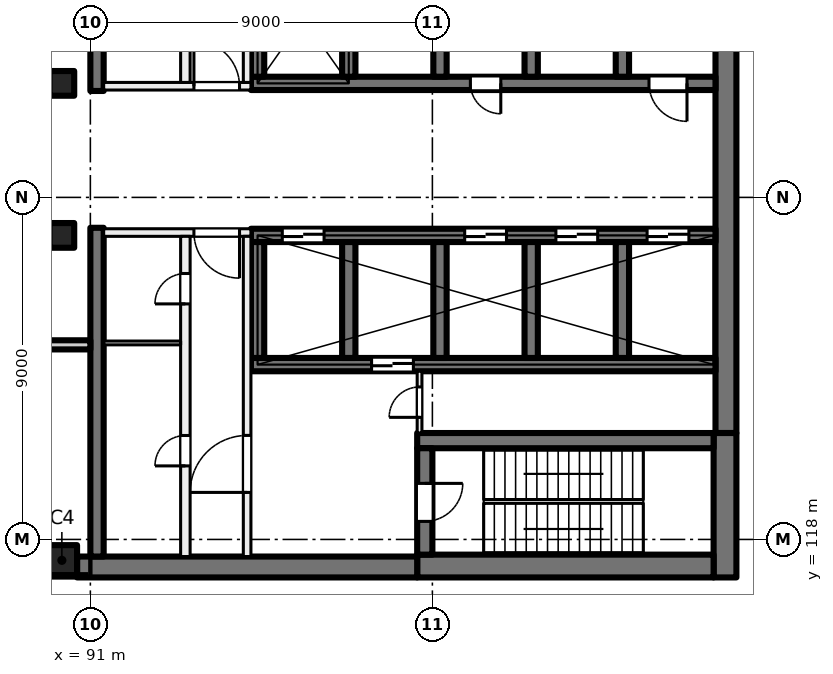
"""IFC4 building model, lengths in metres.
Left out: names, types, materials, properties, quantities, classifications, styles, units other than length and angle.
Written with IfcOpenShell. Run it as: python <this file> out.ifc"""

import sys

from ifc_helpers import new_model, si_unit, direction, frame, frame_2d, origin, origin_2d, place, context, subcontext, project, spatial, rectangle, extrude, element, fill, save


model = new_model("IFC4")
c1 = context("Model", 3, precision=1e-05, world=origin(), true_north=direction((0.0, 1.0)))
c2 = subcontext(c1, "Body", "Model", "MODEL_VIEW")
j1 = project(units=[si_unit("LENGTHUNIT", "METRE"), si_unit("PLANEANGLEUNIT", "RADIAN")], contexts=[c1])
p1 = place(None, origin())
s1 = spatial("IfcSite", under=j1, at=p1, CompositionType="ELEMENT")
p2 = place(p1, origin())
s2 = spatial("IfcBuilding", under=s1, at=p2, CompositionType="ELEMENT")
p3 = place(p2, frame((0.0, 0.0, 182.5)))
s3 = spatial("IfcBuildingStorey", under=s2, at=p3, CompositionType="ELEMENT", Elevation=182.5)
for number, where, z_axis, x_axis in (
    (1, (90.25, 130.0, 0.0), (0.0, 0.0, 1.0), (1.0, 0.0, 0.0)),
    (2, (90.25, 126.0, 0.0), (0.0, 0.0, 1.0), (1.0, 0.0, 0.0)),
):
    element("IfcColumn", number, at=place(p3, frame(where, z_axis=z_axis, x_axis=x_axis)), inside=s3, PredefinedType="COLUMN", context=c2, shape_type="SweptSolid", body=[
        extrude(rectangle(XDim=0.65, YDim=0.65, at=origin_2d()), origin(), (0.0, 0.0, 1.0), 5.5),
    ])
p4 = place(p3, frame((90.25, 117.45, 0.0), z_axis=(0.0, 0.0, 1.0), x_axis=(1.0, 0.0, 0.0)))
e3 = element("IfcColumn", 3, at=p4, inside=s3, PredefinedType="COLUMN", context=c2, shape_type="SweptSolid", body=[
    extrude(rectangle(XDim=0.8, YDim=0.8, at=origin_2d()), origin(), (0.0, 0.0, 1.0), 5.5),
])
p5 = place(p3, frame((107.725, 135.2, 0.0), z_axis=(0.0, 0.0, 1.0), x_axis=(0.0, -1.0, 0.0)))
e4 = element("IfcWall", 4, at=p5, inside=s3, PredefinedType="SHEAR", context=c2, shape_type="SweptSolid", body=[
    extrude(rectangle(XDim=14.4, YDim=0.55, at=frame_2d((7.2, 0.0))), origin(), (0.0, 0.0, 1.0), 5.5),
])
p6 = place(p3, frame((107.7, 120.8, 0.0), z_axis=(0.0, 0.0, 1.0), x_axis=(0.0, -1.0, 0.0)))
e5 = element("IfcWall", 5, at=p6, inside=s3, PredefinedType="SHEAR", context=c2, shape_type="SweptSolid", body=[
    extrude(rectangle(XDim=3.8, YDim=0.6, at=frame_2d((1.9, 0.0))), origin(), (0.0, 0.0, 1.0), 5.5),
])
p7 = place(p3, frame((107.4, 117.3, 0.0), z_axis=(0.0, 0.0, 1.0), x_axis=(-1.0, 0.0, 0.0)))
e6 = element("IfcWall", 6, at=p7, inside=s3, PredefinedType="SHEAR", context=c2, shape_type="SweptSolid", body=[
    extrude(rectangle(XDim=7.8, YDim=0.6, at=frame_2d((3.9, 0.0))), origin(), (0.0, 0.0, 1.0), 5.5),
])
p8 = place(p3, frame((99.6, 117.275, 0.0), z_axis=(0.0, 0.0, 1.0), x_axis=(-1.0, 0.0, 0.0)))
e7 = element("IfcWall", 7, at=p8, inside=s3, PredefinedType="SHEAR", context=c2, shape_type="SweptSolid", body=[
    extrude(rectangle(XDim=8.95, YDim=0.55, at=frame_2d((4.475, 0.0))), origin(), (0.0, 0.0, 1.0), 5.5),
])
p9 = place(p3, frame((107.4, 120.6, 0.0), z_axis=(0.0, 0.0, 1.0), x_axis=(-1.0, 0.0, 0.0)))
e8 = element("IfcWall", 8, at=p9, inside=s3, PredefinedType="SHEAR", context=c2, shape_type="SweptSolid", body=[
    extrude(rectangle(XDim=7.8, YDim=0.4, at=frame_2d((3.9, 0.0))), origin(), (0.0, 0.0, 1.0), 5.5),
])
p10 = place(p3, frame((99.8, 120.4, 0.0), z_axis=(0.0, 0.0, 1.0), x_axis=(0.0, -1.0, 0.0)))
e9 = element("IfcWall", 9, at=p10, inside=s3, PredefinedType="SHEAR", context=c2, shape_type="SweptSolid", body=[
    extrude(rectangle(XDim=2.8, YDim=0.4, at=frame_2d((1.4, 0.0))), origin(), (0.0, 0.0, 1.0), 5.5),
])
p11 = place(p10, frame((0.925, 0.0, 0.0)))
e10 = element("IfcOpeningElement", 10, at=p11, cuts=e9, PredefinedType="OPENING", context=c2, shape_type="SweptSolid", body=[
    extrude(rectangle(XDim=1.0, YDim=2.1, at=frame_2d((0.5, 1.05))), frame((0.0, 0.21, 0.0), z_axis=(0.0, -1.0, 0.0), x_axis=(1.0, 0.0, 0.0)), (0.0, 0.0, 1.0), 0.42),
])
p12 = place(p3, frame((107.45, 130.0, 0.0), z_axis=(0.0, 0.0, 1.0), x_axis=(-1.0, 0.0, 0.0)))
e11 = element("IfcWall", 11, at=p12, inside=s3, PredefinedType="SHEAR", context=c2, shape_type="SweptSolid", body=[
    extrude(rectangle(XDim=12.225, YDim=0.35, at=frame_2d((6.112, 0.0))), origin(), (0.0, 0.0, 1.0), 5.5),
])
p13 = place(p12, frame((0.75, 0.0, 0.0)))
e12 = element("IfcOpeningElement", 12, at=p13, cuts=e11, PredefinedType="OPENING", context=c2, shape_type="SweptSolid", body=[
    extrude(rectangle(XDim=1.0, YDim=2.1, at=frame_2d((0.5, 1.05))), frame((0.0, 0.185, 0.0), z_axis=(0.0, -1.0, 0.0), x_axis=(1.0, 0.0, 0.0)), (0.0, 0.0, 1.0), 0.37),
])
p14 = place(p12, frame((5.65, 0.0, 0.0)))
e13 = element("IfcOpeningElement", 13, at=p14, cuts=e11, PredefinedType="OPENING", context=c2, shape_type="SweptSolid", body=[
    extrude(rectangle(XDim=0.8, YDim=2.1, at=frame_2d((0.4, 1.05))), frame((0.0, 0.185, 0.0), z_axis=(0.0, -1.0, 0.0), x_axis=(1.0, 0.0, 0.0)), (0.0, 0.0, 1.0), 0.37),
])
for number, where, z_axis, x_axis in (
    (14, (105.0, 133.225, 0.0), (0.0, 0.0, 1.0), (0.0, -1.0, 0.0)),
    (15, (102.6, 133.225, 0.0), (0.0, 0.0, 1.0), (0.0, -1.0, 0.0)),
    (16, (100.2, 133.225, 0.0), (0.0, 0.0, 1.0), (0.0, -1.0, 0.0)),
    (17, (97.8, 133.225, 0.0), (0.0, 0.0, 1.0), (0.0, -1.0, 0.0)),
    (18, (95.4, 133.225, 0.0), (0.0, 0.0, 1.0), (0.0, -1.0, 0.0)),
):
    element("IfcWall", number, at=place(p3, frame(where, z_axis=z_axis, x_axis=x_axis)), inside=s3, PredefinedType="SHEAR", context=c2, shape_type="SweptSolid", body=[
        extrude(rectangle(XDim=3.05, YDim=0.35, at=frame_2d((1.525, 0.0))), origin(), (0.0, 0.0, 1.0), 5.5),
    ])
p15 = place(p3, frame((107.45, 126.0, 0.0), z_axis=(0.0, 0.0, 1.0), x_axis=(-1.0, 0.0, 0.0)))
e19 = element("IfcWall", 19, at=p15, inside=s3, PredefinedType="SHEAR", context=c2, shape_type="SweptSolid", body=[
    extrude(rectangle(XDim=12.225, YDim=0.35, at=frame_2d((6.112, 0.0))), origin(), (0.0, 0.0, 1.0), 5.5),
])
p16 = place(p15, frame((0.7, 0.0, 0.0)))
e20 = element("IfcOpeningElement", 20, at=p16, cuts=e19, PredefinedType="OPENING", context=c2, shape_type="SweptSolid", body=[
    extrude(rectangle(XDim=1.1, YDim=2.1, at=frame_2d((0.55, 1.05))), frame((0.0, 0.185, 0.0), z_axis=(0.0, -1.0, 0.0), x_axis=(1.0, 0.0, 0.0)), (0.0, 0.0, 1.0), 0.37),
])
p17 = place(p15, frame((3.1, 0.0, 0.0)))
e21 = element("IfcOpeningElement", 21, at=p17, cuts=e19, PredefinedType="OPENING", context=c2, shape_type="SweptSolid", body=[
    extrude(rectangle(XDim=1.1, YDim=2.1, at=frame_2d((0.55, 1.05))), frame((0.0, 0.185, 0.0), z_axis=(0.0, -1.0, 0.0), x_axis=(1.0, 0.0, 0.0)), (0.0, 0.0, 1.0), 0.37),
])
p18 = place(p15, frame((5.5, 0.0, 0.0)))
e22 = element("IfcOpeningElement", 22, at=p18, cuts=e19, PredefinedType="OPENING", context=c2, shape_type="SweptSolid", body=[
    extrude(rectangle(XDim=1.1, YDim=2.1, at=frame_2d((0.55, 1.05))), frame((0.0, 0.185, 0.0), z_axis=(0.0, -1.0, 0.0), x_axis=(1.0, 0.0, 0.0)), (0.0, 0.0, 1.0), 0.37),
])
p19 = place(p15, frame((10.3, 0.0, 0.0)))
e23 = element("IfcOpeningElement", 23, at=p19, cuts=e19, PredefinedType="OPENING", context=c2, shape_type="SweptSolid", body=[
    extrude(rectangle(XDim=1.1, YDim=2.1, at=frame_2d((0.55, 1.05))), frame((0.0, 0.185, 0.0), z_axis=(0.0, -1.0, 0.0), x_axis=(1.0, 0.0, 0.0)), (0.0, 0.0, 1.0), 0.37),
])
p20 = place(p3, frame((107.45, 122.6, 0.0), z_axis=(0.0, 0.0, 1.0), x_axis=(-1.0, 0.0, 0.0)))
e24 = element("IfcWall", 24, at=p20, inside=s3, PredefinedType="SHEAR", context=c2, shape_type="SweptSolid", body=[
    extrude(rectangle(XDim=12.225, YDim=0.35, at=frame_2d((6.112, 0.0))), origin(), (0.0, 0.0, 1.0), 5.5),
])
p21 = place(p20, frame((7.95, 0.0, 0.0)))
e25 = element("IfcOpeningElement", 25, at=p21, cuts=e24, PredefinedType="OPENING", context=c2, shape_type="SweptSolid", body=[
    extrude(rectangle(XDim=1.1, YDim=2.1, at=frame_2d((0.55, 1.05))), frame((0.0, 0.185, 0.0), z_axis=(0.0, -1.0, 0.0), x_axis=(1.0, 0.0, 0.0)), (0.0, 0.0, 1.0), 0.37),
])
for number, where, z_axis, x_axis in (
    (26, (105.0, 125.825, 0.0), (0.0, 0.0, 1.0), (0.0, -1.0, 0.0)),
    (27, (102.6, 125.825, 0.0), (0.0, 0.0, 1.0), (0.0, -1.0, 0.0)),
    (28, (100.2, 125.825, 0.0), (0.0, 0.0, 1.0), (0.0, -1.0, 0.0)),
    (29, (97.8, 125.825, 0.0), (0.0, 0.0, 1.0), (0.0, -1.0, 0.0)),
    (30, (95.4, 125.825, 0.0), (0.0, 0.0, 1.0), (0.0, -1.0, 0.0)),
):
    element("IfcWall", number, at=place(p3, frame(where, z_axis=z_axis, x_axis=x_axis)), inside=s3, PredefinedType="SHEAR", context=c2, shape_type="SweptSolid", body=[
        extrude(rectangle(XDim=3.05, YDim=0.35, at=frame_2d((1.525, 0.0))), origin(), (0.0, 0.0, 1.0), 5.5),
    ])
for number, where, z_axis, x_axis in (
    (31, (91.175, 138.45, 0.0), (0.0, 0.0, 1.0), (0.0, -1.0, 0.0)),
    (32, (91.175, 126.2, 0.0), (0.0, 0.0, 1.0), (0.0, -1.0, 0.0)),
):
    element("IfcWall", number, at=place(p3, frame(where, z_axis=z_axis, x_axis=x_axis)), inside=s3, PredefinedType="SHEAR", context=c2, shape_type="SweptSolid", body=[
        extrude(rectangle(XDim=8.65, YDim=0.35, at=frame_2d((4.325, 0.0))), origin(), (0.0, 0.0, 1.0), 5.5),
    ])
p22 = place(p3, frame((91.0, 123.12, 0.0), z_axis=(0.0, 0.0, 1.0), x_axis=(-1.0, 0.0, 0.0)))
e33 = element("IfcWall", 33, at=p22, inside=s3, PredefinedType="SOLIDWALL", context=c2, shape_type="SweptSolid", body=[
    extrude(rectangle(XDim=4.221, YDim=0.24, at=frame_2d((2.11, 0.0))), origin(), (0.0, 0.0, 1.0), 5.125),
])
p23 = place(p22, frame((1.21, 0.0, 0.0)))
e34 = element("IfcOpeningElement", 34, at=p23, cuts=e33, PredefinedType="OPENING", context=c2, shape_type="SweptSolid", body=[
    extrude(rectangle(XDim=1.8, YDim=2.4, at=frame_2d((0.9, 1.2))), frame((0.0, 0.13, 0.0), z_axis=(0.0, -1.0, 0.0), x_axis=(1.0, 0.0, 0.0)), (0.0, 0.0, 1.0), 0.26),
])
p24 = place(p3, frame((95.225, 126.075, 0.0), z_axis=(0.0, 0.0, 1.0), x_axis=(-1.0, 0.0, 0.0)))
e35 = element("IfcWall", 35, at=p24, inside=s3, PredefinedType="PARTITIONING", context=c2, shape_type="SweptSolid", body=[
    extrude(rectangle(XDim=3.875, YDim=0.2, at=frame_2d((1.938, 0.0))), origin(), (0.0, 0.0, 1.0), 5.125),
])
p25 = place(p24, frame((0.3, 0.0, 0.0)))
e36 = element("IfcOpeningElement", 36, at=p25, cuts=e35, PredefinedType="OPENING", context=c2, shape_type="SweptSolid", body=[
    extrude(rectangle(XDim=1.2, YDim=2.1, at=frame_2d((0.6, 1.05))), frame((0.0, 0.11, 0.0), z_axis=(0.0, -1.0, 0.0), x_axis=(1.0, 0.0, 0.0)), (0.0, 0.0, 1.0), 0.22),
])
p26 = place(p3, frame((95.125, 117.55, 0.0), z_axis=(0.0, 0.0, 1.0), x_axis=(0.0, 1.0, 0.0)))
e37 = element("IfcWall", 37, at=p26, inside=s3, PredefinedType="PARTITIONING", context=c2, shape_type="SweptSolid", body=[
    extrude(rectangle(XDim=8.425, YDim=0.2, at=frame_2d((4.212, 0.0))), origin(), (0.0, 0.0, 1.0), 5.125),
])
p27 = place(p26, frame((1.688, 0.0, 0.0)))
e38 = element("IfcOpeningElement", 38, at=p27, cuts=e37, PredefinedType="OPENING", context=c2, shape_type="SweptSolid", body=[
    extrude(rectangle(XDim=1.5, YDim=2.1, at=frame_2d((0.75, 1.05))), frame((0.0, 0.11, 0.0), z_axis=(0.0, -1.0, 0.0), x_axis=(1.0, 0.0, 0.0)), (0.0, 0.0, 1.0), 0.22),
])
p28 = place(p3, frame((93.5, 117.55, 0.0), z_axis=(0.0, 0.0, 1.0), x_axis=(0.0, 1.0, 0.0)))
e39 = element("IfcWall", 39, at=p28, inside=s3, PredefinedType="PARTITIONING", context=c2, shape_type="SweptSolid", body=[
    extrude(rectangle(XDim=8.425, YDim=0.25, at=frame_2d((4.212, 0.0))), origin(), (0.0, 0.0, 1.0), 5.125),
])
p29 = place(p28, frame((6.647, 0.0, 0.0)))
e40 = element("IfcOpeningElement", 40, at=p29, cuts=e39, PredefinedType="OPENING", context=c2, shape_type="SweptSolid", body=[
    extrude(rectangle(XDim=0.8, YDim=2.1, at=frame_2d((0.4, 1.05))), frame((0.0, 0.135, 0.0), z_axis=(0.0, -1.0, 0.0), x_axis=(1.0, 0.0, 0.0)), (0.0, 0.0, 1.0), 0.27),
])
p30 = place(p28, frame((2.385, 0.0, 0.0)))
e41 = element("IfcOpeningElement", 41, at=p30, cuts=e39, PredefinedType="OPENING", context=c2, shape_type="SweptSolid", body=[
    extrude(rectangle(XDim=0.8, YDim=2.1, at=frame_2d((0.4, 1.05))), frame((0.0, 0.135, 0.0), z_axis=(0.0, -1.0, 0.0), x_axis=(1.0, 0.0, 0.0)), (0.0, 0.0, 1.0), 0.27),
])
p31 = place(p3, frame((99.663, 120.8, 0.0), z_axis=(0.0, 0.0, 1.0), x_axis=(0.0, 1.0, 0.0)))
e42 = element("IfcWall", 42, at=p31, inside=s3, PredefinedType="PARTITIONING", context=c2, shape_type="SweptSolid", body=[
    extrude(rectangle(XDim=1.625, YDim=0.125, at=frame_2d((0.812, 0.0))), origin(), (0.0, 0.0, 1.0), 5.125),
])
p32 = place(p31, frame((0.413, 0.0, 0.0)))
e43 = element("IfcOpeningElement", 43, at=p32, cuts=e42, PredefinedType="OPENING", context=c2, shape_type="SweptSolid", body=[
    extrude(rectangle(XDim=0.8, YDim=2.1, at=frame_2d((0.4, 1.05))), frame((0.0, 0.073, 0.0), z_axis=(0.0, -1.0, 0.0), x_axis=(1.0, 0.0, 0.0)), (0.0, 0.0, 1.0), 0.145),
])
p33 = place(p3, frame((93.375, 123.17, 0.0), z_axis=(0.0, 0.0, 1.0), x_axis=(-1.0, 0.0, 0.0)))
e44 = element("IfcWall", 44, at=p33, inside=s3, PredefinedType="PARTITIONING", context=c2, shape_type="SweptSolid", body=[
    extrude(rectangle(XDim=2.025, YDim=0.1, at=frame_2d((1.012, 0.0))), origin(), (0.0, 0.0, 1.0), 5.125),
])
p34 = place(p3, frame((91.35, 129.925, 0.0), z_axis=(0.0, 0.0, 1.0), x_axis=(1.0, 0.0, 0.0)))
e45 = element("IfcWall", 45, at=p34, inside=s3, PredefinedType="PARTITIONING", context=c2, shape_type="SweptSolid", body=[
    extrude(rectangle(XDim=3.875, YDim=0.2, at=frame_2d((1.938, 0.0))), origin(), (0.0, 0.0, 1.0), 5.125),
])
p35 = place(p34, frame((2.375, 0.0, 0.0)))
e46 = element("IfcOpeningElement", 46, at=p35, cuts=e45, PredefinedType="OPENING", context=c2, shape_type="SweptSolid", body=[
    extrude(rectangle(XDim=1.2, YDim=2.1, at=frame_2d((0.6, 1.05))), frame((0.0, 0.11, 0.0), z_axis=(0.0, -1.0, 0.0), x_axis=(1.0, 0.0, 0.0)), (0.0, 0.0, 1.0), 0.22),
])
p36 = place(p3, frame((95.125, 130.025, 0.0), z_axis=(0.0, 0.0, 1.0), x_axis=(0.0, 1.0, 0.0)))
e47 = element("IfcWall", 47, at=p36, inside=s3, PredefinedType="PARTITIONING", context=c2, shape_type="SweptSolid", body=[
    extrude(rectangle(XDim=8.425, YDim=0.2, at=frame_2d((4.212, 0.0))), origin(), (0.0, 0.0, 1.0), 5.125),
])
p37 = place(p36, frame((5.238, 0.0, 0.0)))
e48 = element("IfcOpeningElement", 48, at=p37, cuts=e47, PredefinedType="OPENING", context=c2, shape_type="SweptSolid", body=[
    extrude(rectangle(XDim=1.5, YDim=2.1, at=frame_2d((0.75, 1.05))), frame((0.0, 0.11, 0.0), z_axis=(0.0, -1.0, 0.0), x_axis=(1.0, 0.0, 0.0)), (0.0, 0.0, 1.0), 0.22),
])
p38 = place(p3, frame((93.5, 130.025, 0.0), z_axis=(0.0, 0.0, 1.0), x_axis=(0.0, 1.0, 0.0)))
e49 = element("IfcWall", 49, at=p38, inside=s3, PredefinedType="PARTITIONING", context=c2, shape_type="SweptSolid", body=[
    extrude(rectangle(XDim=8.425, YDim=0.25, at=frame_2d((4.212, 0.0))), origin(), (0.0, 0.0, 1.0), 5.125),
])
p39 = place(p38, frame((3.712, 0.0, 0.0)))
e50 = element("IfcOpeningElement", 50, at=p39, cuts=e49, PredefinedType="OPENING", context=c2, shape_type="SweptSolid", body=[
    extrude(rectangle(XDim=1.0, YDim=2.1, at=frame_2d((0.5, 1.05))), frame((0.0, 0.135, 0.0), z_axis=(0.0, -1.0, 0.0), x_axis=(1.0, 0.0, 0.0)), (0.0, 0.0, 1.0), 0.27),
])
p40 = place(p16, origin())
e51 = element("IfcDoor", 51, at=p40, inside=s3, OperationType="DOUBLE_DOOR_SLIDING", PredefinedType="DOOR", context=c2, shape_type="SweptSolid", body=[
    extrude(rectangle(XDim=1.1, YDim=2.1, at=frame_2d((0.55, 1.05))), frame((0.0, 0.025, 0.0), z_axis=(0.0, -1.0, 0.0), x_axis=(1.0, 0.0, 0.0)), (0.0, 0.0, 1.0), 0.05),
])
fill(e20, e51)
p41 = place(p17, origin())
e52 = element("IfcDoor", 52, at=p41, inside=s3, OperationType="DOUBLE_DOOR_SLIDING", PredefinedType="DOOR", context=c2, shape_type="SweptSolid", body=[
    extrude(rectangle(XDim=1.1, YDim=2.1, at=frame_2d((0.55, 1.05))), frame((0.0, 0.025, 0.0), z_axis=(0.0, -1.0, 0.0), x_axis=(1.0, 0.0, 0.0)), (0.0, 0.0, 1.0), 0.05),
])
fill(e21, e52)
p42 = place(p18, origin())
e53 = element("IfcDoor", 53, at=p42, inside=s3, OperationType="DOUBLE_DOOR_SLIDING", PredefinedType="DOOR", context=c2, shape_type="SweptSolid", body=[
    extrude(rectangle(XDim=1.1, YDim=2.1, at=frame_2d((0.55, 1.05))), frame((0.0, 0.025, 0.0), z_axis=(0.0, -1.0, 0.0), x_axis=(1.0, 0.0, 0.0)), (0.0, 0.0, 1.0), 0.05),
])
fill(e22, e53)
p43 = place(p19, origin())
e54 = element("IfcDoor", 54, at=p43, inside=s3, OperationType="DOUBLE_DOOR_SLIDING", PredefinedType="DOOR", context=c2, shape_type="SweptSolid", body=[
    extrude(rectangle(XDim=1.1, YDim=2.1, at=frame_2d((0.55, 1.05))), frame((0.0, 0.025, 0.0), z_axis=(0.0, -1.0, 0.0), x_axis=(1.0, 0.0, 0.0)), (0.0, 0.0, 1.0), 0.05),
])
fill(e23, e54)
p44 = place(p13, origin())
e55 = element("IfcDoor", 55, at=p44, inside=s3, OperationType="SINGLE_SWING_LEFT", PredefinedType="DOOR", context=c2, shape_type="SweptSolid", body=[
    extrude(rectangle(XDim=1.0, YDim=2.1, at=frame_2d((0.5, 1.05))), frame((0.0, 0.025, 0.0), z_axis=(0.0, -1.0, 0.0), x_axis=(1.0, 0.0, 0.0)), (0.0, 0.0, 1.0), 0.05),
])
fill(e12, e55)
p45 = place(p14, origin())
e56 = element("IfcDoor", 56, at=p45, inside=s3, OperationType="SINGLE_SWING_RIGHT", PredefinedType="DOOR", context=c2, shape_type="SweptSolid", body=[
    extrude(rectangle(XDim=0.8, YDim=2.1, at=frame_2d((0.4, 1.05))), frame((0.0, 0.025, 0.0), z_axis=(0.0, -1.0, 0.0), x_axis=(1.0, 0.0, 0.0)), (0.0, 0.0, 1.0), 0.05),
])
fill(e13, e56)
p46 = place(p25, origin())
e57 = element("IfcDoor", 57, at=p46, inside=s3, OperationType="DOUBLE_DOOR_SINGLE_SWING", PredefinedType="DOOR", context=c2, shape_type="SweptSolid", body=[
    extrude(rectangle(XDim=1.2, YDim=2.1, at=frame_2d((0.6, 1.05))), frame((0.0, 0.025, 0.0), z_axis=(0.0, -1.0, 0.0), x_axis=(1.0, 0.0, 0.0)), (0.0, 0.0, 1.0), 0.05),
])
fill(e36, e57)
p47 = place(p27, origin())
e58 = element("IfcDoor", 58, at=p47, inside=s3, OperationType="DOUBLE_DOOR_SINGLE_SWING", PredefinedType="DOOR", context=c2, shape_type="SweptSolid", body=[
    extrude(rectangle(XDim=1.5, YDim=2.1, at=frame_2d((0.75, 1.05))), frame((0.0, 0.025, 0.0), z_axis=(0.0, -1.0, 0.0), x_axis=(1.0, 0.0, 0.0)), (0.0, 0.0, 1.0), 0.05),
])
fill(e38, e58)
p48 = place(p11, origin())
e59 = element("IfcDoor", 59, at=p48, inside=s3, OperationType="SINGLE_SWING_LEFT", PredefinedType="DOOR", context=c2, shape_type="SweptSolid", body=[
    extrude(rectangle(XDim=1.0, YDim=2.1, at=frame_2d((0.5, 1.05))), frame((0.0, 0.025, 0.0), z_axis=(0.0, -1.0, 0.0), x_axis=(1.0, 0.0, 0.0)), (0.0, 0.0, 1.0), 0.05),
])
fill(e10, e59)
p49 = place(p32, origin())
e60 = element("IfcDoor", 60, at=p49, inside=s3, OperationType="SINGLE_SWING_RIGHT", PredefinedType="DOOR", context=c2, shape_type="SweptSolid", body=[
    extrude(rectangle(XDim=0.8, YDim=2.1, at=frame_2d((0.4, 1.05))), frame((0.0, 0.025, 0.0), z_axis=(0.0, -1.0, 0.0), x_axis=(1.0, 0.0, 0.0)), (0.0, 0.0, 1.0), 0.05),
])
fill(e43, e60)
p50 = place(p29, origin())
e61 = element("IfcDoor", 61, at=p50, inside=s3, OperationType="SINGLE_SWING_LEFT", PredefinedType="DOOR", context=c2, shape_type="SweptSolid", body=[
    extrude(rectangle(XDim=0.8, YDim=2.1, at=frame_2d((0.4, 1.05))), frame((0.0, 0.025, 0.0), z_axis=(0.0, -1.0, 0.0), x_axis=(1.0, 0.0, 0.0)), (0.0, 0.0, 1.0), 0.05),
])
fill(e40, e61)
p51 = place(p30, origin())
e62 = element("IfcDoor", 62, at=p51, inside=s3, OperationType="SINGLE_SWING_RIGHT", PredefinedType="DOOR", context=c2, shape_type="SweptSolid", body=[
    extrude(rectangle(XDim=0.8, YDim=2.1, at=frame_2d((0.4, 1.05))), frame((0.0, 0.025, 0.0), z_axis=(0.0, -1.0, 0.0), x_axis=(1.0, 0.0, 0.0)), (0.0, 0.0, 1.0), 0.05),
])
fill(e41, e62)
p52 = place(p35, origin())
e63 = element("IfcDoor", 63, at=p52, inside=s3, OperationType="DOUBLE_DOOR_SINGLE_SWING", PredefinedType="DOOR", context=c2, shape_type="SweptSolid", body=[
    extrude(rectangle(XDim=1.2, YDim=2.1, at=frame_2d((0.6, 1.05))), frame((0.0, 0.025, 0.0), z_axis=(0.0, -1.0, 0.0), x_axis=(1.0, 0.0, 0.0)), (0.0, 0.0, 1.0), 0.05),
])
fill(e46, e63)
p53 = place(p21, origin())
e64 = element("IfcDoor", 64, at=p53, inside=s3, OperationType="DOUBLE_DOOR_SLIDING", PredefinedType="DOOR", context=c2, shape_type="SweptSolid", body=[
    extrude(rectangle(XDim=1.1, YDim=2.1, at=frame_2d((0.55, 1.05))), frame((0.0, 0.025, 0.0), z_axis=(0.0, -1.0, 0.0), x_axis=(1.0, 0.0, 0.0)), (0.0, 0.0, 1.0), 0.05),
])
fill(e25, e64)
save(model, sys.argv[1])
